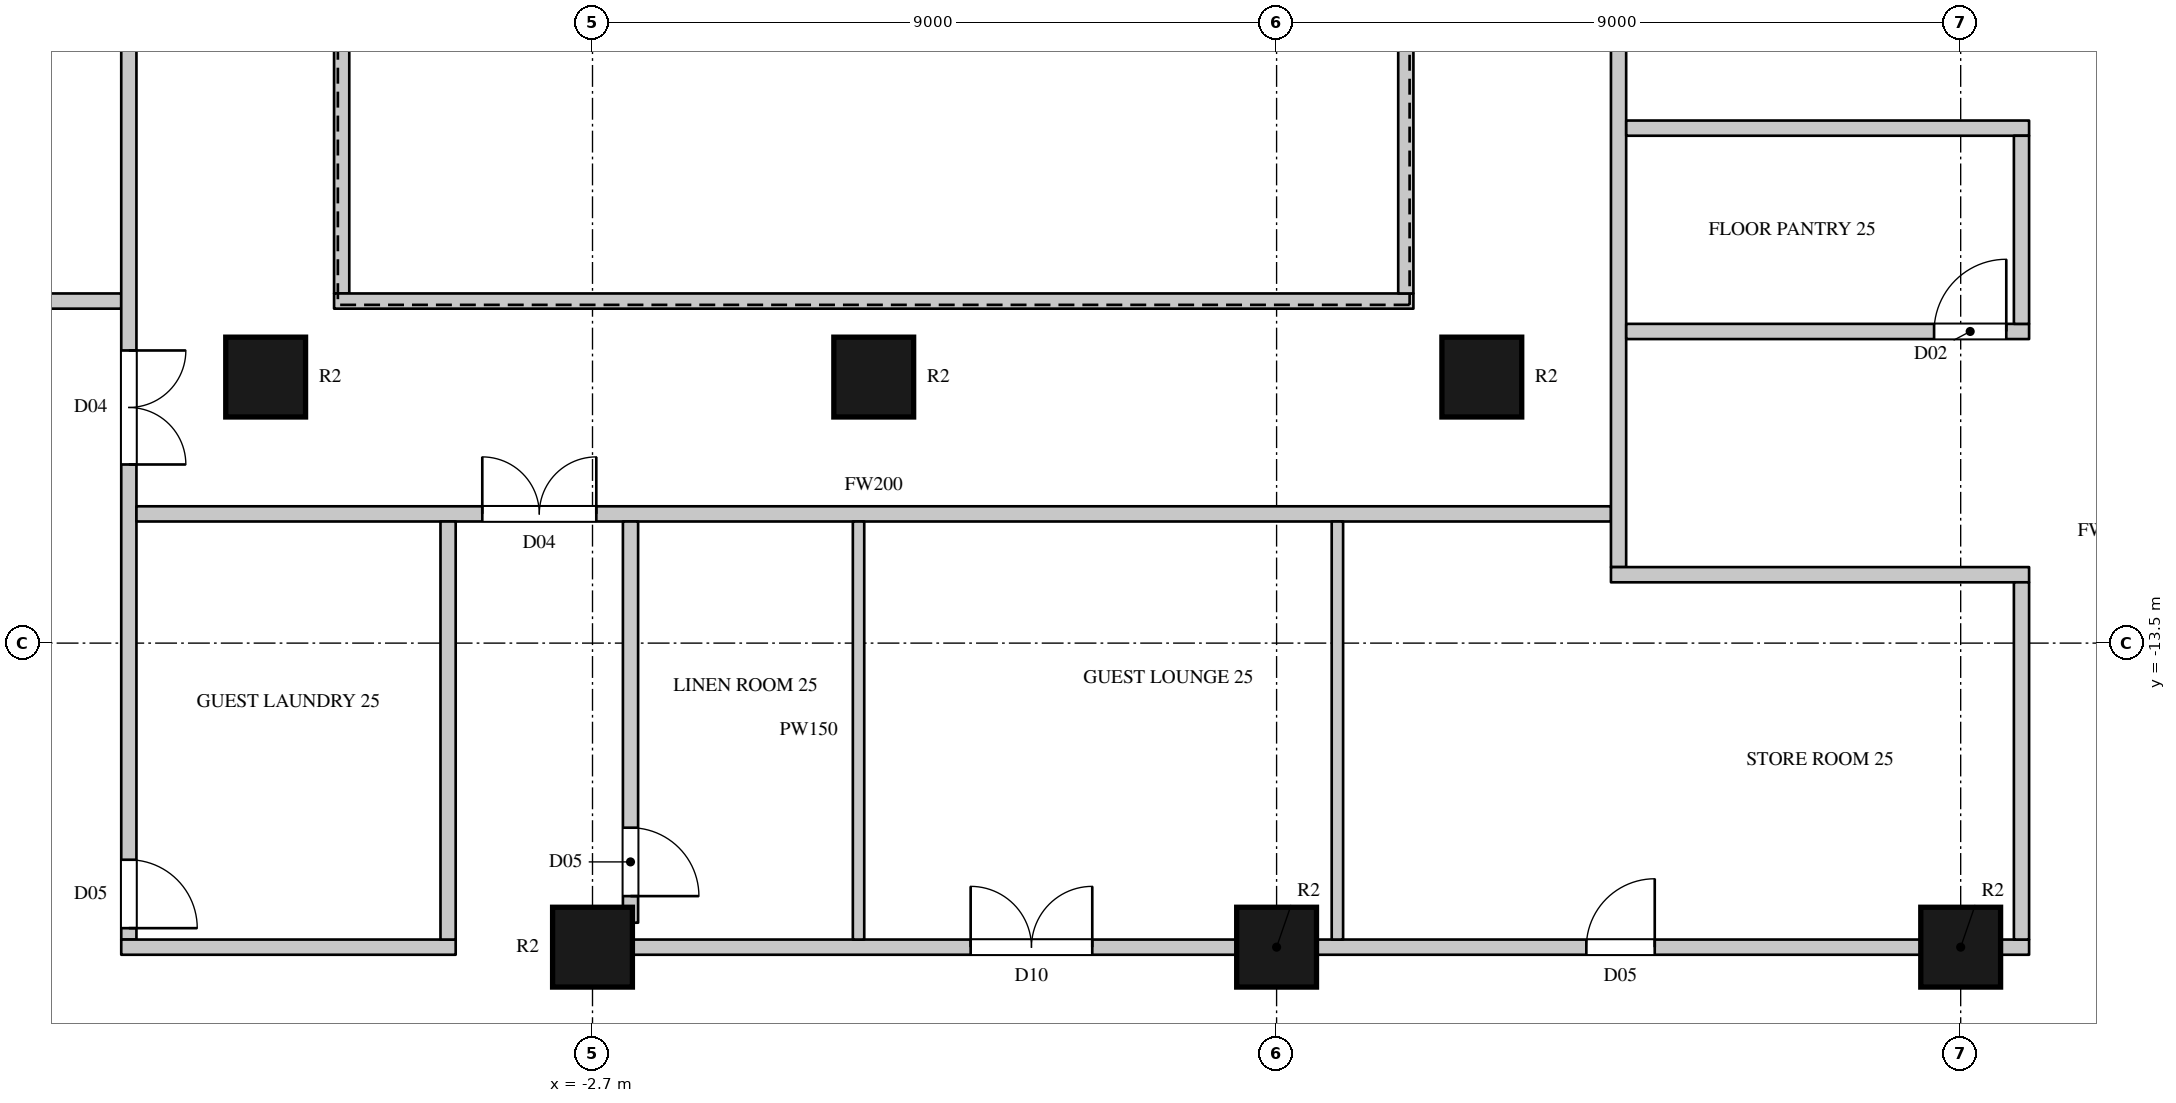
"""IFC4 building model, lengths in metres.
Left out: names, types, materials, properties, quantities, classifications, styles, units other than length and angle.
Written with IfcOpenShell. Run it as: python <this file> out.ifc"""

import sys

from ifc_helpers import new_model, si_unit, direction, frame, frame_2d, origin, origin_2d, place, context, subcontext, project, spatial, rectangle, circle, extrude, element, fill, save


model = new_model("IFC4")
c1 = context("Model", 3, precision=1e-05, world=origin(), true_north=direction((0.0, 1.0)))
c2 = subcontext(c1, "Body", "Model", "MODEL_VIEW")
j1 = project(units=[si_unit("LENGTHUNIT", "METRE"), si_unit("PLANEANGLEUNIT", "RADIAN")], contexts=[c1])
p1 = place(None, origin())
s1 = spatial("IfcSite", under=j1, at=p1, CompositionType="ELEMENT")
p2 = place(p1, origin())
s2 = spatial("IfcBuilding", under=s1, at=p2, CompositionType="ELEMENT")
p3 = place(p2, frame((0.0, 0.0, 120.3)))
s3 = spatial("IfcBuildingStorey", under=s2, at=p3, CompositionType="ELEMENT", Elevation=120.3)
for number, where, z_axis, x_axis in (
    (1, (-2.7, -17.5, 0.0), (0.0, 0.0, 1.0), (1.0, 0.0, 0.0)),
    (2, (6.3, -17.5, 0.0), (0.0, 0.0, 1.0), (1.0, 0.0, 0.0)),
    (3, (15.3, -17.5, 0.0), (0.0, 0.0, 1.0), (1.0, 0.0, 0.0)),
    (4, (-7.0, -10.0, 0.0), (0.0, 0.0, 1.0), (1.0, 0.0, 0.0)),
    (5, (1.0, -10.0, 0.0), (0.0, 0.0, 1.0), (1.0, 0.0, 0.0)),
    (6, (9.0, -10.0, 0.0), (0.0, 0.0, 1.0), (1.0, 0.0, 0.0)),
):
    element("IfcColumn", number, at=place(p3, frame(where, z_axis=z_axis, x_axis=x_axis)), inside=s3, PredefinedType="COLUMN", context=c2, shape_type="SweptSolid", body=[
        extrude(circle(Radius=0.525, at=origin_2d()), origin(), (0.0, 0.0, 1.0), 3.6),
    ])
p4 = place(p3, frame((-13.97, -9.0, 0.0), z_axis=(0.0, 0.0, 1.0), x_axis=(1.0, 0.0, 0.0)))
e7 = element("IfcWall", 7, at=p4, inside=s3, PredefinedType="PARTITIONING", context=c2, shape_type="SweptSolid", body=[
    extrude(rectangle(XDim=5.07, YDim=0.2, at=frame_2d((2.535, 0.0))), origin(), (0.0, 0.0, 1.0), 3.3),
])
p5 = place(p4, frame((0.4, 0.0, 0.0)))
e8 = element("IfcOpeningElement", 8, at=p5, cuts=e7, PredefinedType="OPENING", context=c2, shape_type="SweptSolid", body=[
    extrude(rectangle(XDim=1.5, YDim=2.2, at=frame_2d((0.75, 1.1))), frame((0.0, 0.11, 0.0), z_axis=(0.0, -1.0, 0.0), x_axis=(1.0, 0.0, 0.0)), (0.0, 0.0, 1.0), 0.22),
])
p6 = place(p4, frame((2.05, 0.0, 0.0)))
e9 = element("IfcOpeningElement", 9, at=p6, cuts=e7, PredefinedType="OPENING", context=c2, shape_type="SweptSolid", body=[
    extrude(rectangle(XDim=1.5, YDim=2.2, at=frame_2d((0.75, 1.1))), frame((0.0, 0.11, 0.0), z_axis=(0.0, -1.0, 0.0), x_axis=(1.0, 0.0, 0.0)), (0.0, 0.0, 1.0), 0.22),
])
p7 = place(p3, frame((-8.8, -17.4, 0.0), z_axis=(0.0, 0.0, 1.0), x_axis=(0.0, 1.0, 0.0)))
e10 = element("IfcWall", 10, at=p7, inside=s3, PredefinedType="PARTITIONING", context=c2, shape_type="SweptSolid", body=[
    extrude(rectangle(XDim=29.1, YDim=0.2, at=frame_2d((14.55, 0.0))), origin(), (0.0, 0.0, 1.0), 3.3),
])
p8 = place(p7, frame((21.15, 0.0, 0.0)))
e11 = element("IfcOpeningElement", 11, at=p8, cuts=e10, PredefinedType="OPENING", context=c2, shape_type="SweptSolid", body=[
    extrude(rectangle(XDim=1.5, YDim=2.2, at=frame_2d((0.75, 1.1))), frame((0.0, 0.11, 0.0), z_axis=(0.0, -1.0, 0.0), x_axis=(1.0, 0.0, 0.0)), (0.0, 0.0, 1.0), 0.22),
])
p9 = place(p7, frame((6.25, 0.0, 0.0)))
e12 = element("IfcOpeningElement", 12, at=p9, cuts=e10, PredefinedType="OPENING", context=c2, shape_type="SweptSolid", body=[
    extrude(rectangle(XDim=1.5, YDim=2.2, at=frame_2d((0.75, 1.1))), frame((0.0, 0.11, 0.0), z_axis=(0.0, -1.0, 0.0), x_axis=(1.0, 0.0, 0.0)), (0.0, 0.0, 1.0), 0.22),
])
p10 = place(p7, frame((27.45, 0.0, 0.0)))
e13 = element("IfcOpeningElement", 13, at=p10, cuts=e10, PredefinedType="OPENING", context=c2, shape_type="SweptSolid", body=[
    extrude(rectangle(XDim=1.5, YDim=2.2, at=frame_2d((0.75, 1.1))), frame((0.0, 0.11, 0.0), z_axis=(0.0, -1.0, 0.0), x_axis=(1.0, 0.0, 0.0)), (0.0, 0.0, 1.0), 0.22),
])
p11 = place(p7, frame((0.15, 0.0, 0.0)))
e14 = element("IfcOpeningElement", 14, at=p11, cuts=e10, PredefinedType="OPENING", context=c2, shape_type="SweptSolid", body=[
    extrude(rectangle(XDim=0.9, YDim=2.2, at=frame_2d((0.45, 1.1))), frame((0.0, 0.11, 0.0), z_axis=(0.0, -1.0, 0.0), x_axis=(1.0, 0.0, 0.0)), (0.0, 0.0, 1.0), 0.22),
])
p12 = place(p3, frame((-8.9, -17.5, 0.0), z_axis=(0.0, 0.0, 1.0), x_axis=(1.0, 0.0, 0.0)))
e15 = element("IfcWall", 15, at=p12, inside=s3, PredefinedType="PARTITIONING", context=c2, shape_type="SweptSolid", body=[
    extrude(rectangle(XDim=4.4, YDim=0.2, at=frame_2d((2.2, 0.0))), origin(), (0.0, 0.0, 1.0), 2.75),
])
p13 = place(p3, frame((-8.7, -11.8, 0.0), z_axis=(0.0, 0.0, 1.0), x_axis=(1.0, 0.0, 0.0)))
e16 = element("IfcWall", 16, at=p13, inside=s3, PredefinedType="PARTITIONING", context=c2, shape_type="SweptSolid", body=[
    extrude(rectangle(XDim=19.4, YDim=0.2, at=frame_2d((9.7, 0.0))), origin(), (0.0, 0.0, 1.0), 3.3),
])
p14 = place(p13, frame((4.55, 0.0, 0.0)))
e17 = element("IfcOpeningElement", 17, at=p14, cuts=e16, PredefinedType="OPENING", context=c2, shape_type="SweptSolid", body=[
    extrude(rectangle(XDim=1.5, YDim=2.2, at=frame_2d((0.75, 1.1))), frame((0.0, 0.11, 0.0), z_axis=(0.0, -1.0, 0.0), x_axis=(1.0, 0.0, 0.0)), (0.0, 0.0, 1.0), 0.22),
])
p15 = place(p3, frame((-6.0, -8.9, 0.0), z_axis=(0.0, 0.0, 1.0), x_axis=(0.0, 1.0, 0.0)))
e18 = element("IfcWall", 18, at=p15, inside=s3, PredefinedType="PARTITIONING", context=c2, shape_type="SweptSolid", body=[
    extrude(rectangle(XDim=17.8, YDim=0.2, at=frame_2d((8.9, 0.0))), origin(), (0.0, 0.0, 1.0), 3.3),
])
p16 = place(p3, frame((-6.1, -9.0, 0.0), z_axis=(0.0, 0.0, 1.0), x_axis=(1.0, 0.0, 0.0)))
e19 = element("IfcWall", 19, at=p16, inside=s3, PredefinedType="PARTITIONING", context=c2, shape_type="SweptSolid", body=[
    extrude(rectangle(XDim=14.2, YDim=0.2, at=frame_2d((7.1, 0.0))), origin(), (0.0, 0.0, 1.0), 3.3),
])
p17 = place(p3, frame((-4.6, -17.4, 0.0), z_axis=(0.0, 0.0, 1.0), x_axis=(0.0, 1.0, 0.0)))
e20 = element("IfcWall", 20, at=p17, inside=s3, PredefinedType="PARTITIONING", context=c2, shape_type="SweptSolid", body=[
    extrude(rectangle(XDim=5.5, YDim=0.2, at=frame_2d((2.75, 0.0))), origin(), (0.0, 0.0, 1.0), 3.3),
])
p18 = place(p3, frame((-2.2, -17.178, 0.0), z_axis=(0.0, 0.0, 1.0), x_axis=(0.0, 1.0, 0.0)))
e21 = element("IfcWall", 21, at=p18, inside=s3, PredefinedType="PARTITIONING", context=c2, shape_type="SweptSolid", body=[
    extrude(rectangle(XDim=5.279, YDim=0.2, at=frame_2d((2.639, 0.0))), origin(), (0.0, 0.0, 1.0), 3.3),
])
p19 = place(p18, frame((0.35, 0.0, 0.0)))
e22 = element("IfcOpeningElement", 22, at=p19, cuts=e21, PredefinedType="OPENING", context=c2, shape_type="SweptSolid", body=[
    extrude(rectangle(XDim=0.9, YDim=2.2, at=frame_2d((0.45, 1.1))), frame((0.0, 0.11, 0.0), z_axis=(0.0, -1.0, 0.0), x_axis=(1.0, 0.0, 0.0)), (0.0, 0.0, 1.0), 0.22),
])
p20 = place(p3, frame((-2.175, -17.5, 0.0), z_axis=(0.0, 0.0, 1.0), x_axis=(1.0, 0.0, 0.0)))
e23 = element("IfcWall", 23, at=p20, inside=s3, PredefinedType="PARTITIONING", context=c2, shape_type="SweptSolid", body=[
    extrude(rectangle(XDim=7.95, YDim=0.2, at=frame_2d((3.975, 0.0))), origin(), (0.0, 0.0, 1.0), 2.75),
])
p21 = place(p20, frame((4.45, 0.0, 0.0)))
e24 = element("IfcOpeningElement", 24, at=p21, cuts=e23, PredefinedType="OPENING", context=c2, shape_type="SweptSolid", body=[
    extrude(rectangle(XDim=1.6, YDim=2.4, at=frame_2d((0.8, 1.2))), frame((0.0, 0.11, 0.0), z_axis=(0.0, -1.0, 0.0), x_axis=(1.0, 0.0, 0.0)), (0.0, 0.0, 1.0), 0.22),
])
p22 = place(p3, frame((6.825, -17.5, 0.0), z_axis=(0.0, 0.0, 1.0), x_axis=(1.0, 0.0, 0.0)))
e25 = element("IfcWall", 25, at=p22, inside=s3, PredefinedType="PARTITIONING", context=c2, shape_type="SweptSolid", body=[
    extrude(rectangle(XDim=7.95, YDim=0.2, at=frame_2d((3.975, 0.0))), origin(), (0.0, 0.0, 1.0), 2.75),
])
p23 = place(p22, frame((3.55, 0.0, 0.0)))
e26 = element("IfcOpeningElement", 26, at=p23, cuts=e25, PredefinedType="OPENING", context=c2, shape_type="SweptSolid", body=[
    extrude(rectangle(XDim=0.9, YDim=2.2, at=frame_2d((0.45, 1.1))), frame((0.0, 0.11, 0.0), z_axis=(0.0, -1.0, 0.0), x_axis=(1.0, 0.0, 0.0)), (0.0, 0.0, 1.0), 0.22),
])
p24 = place(p3, frame((15.825, -17.5, 0.0), z_axis=(0.0, 0.0, 1.0), x_axis=(1.0, 0.0, 0.0)))
e27 = element("IfcWall", 27, at=p24, inside=s3, PredefinedType="PARTITIONING", context=c2, shape_type="SweptSolid", body=[
    extrude(rectangle(XDim=0.375, YDim=0.2, at=frame_2d((0.188, 0.0))), origin(), (0.0, 0.0, 1.0), 3.3),
])
p25 = place(p3, frame((8.0, -8.9, 0.0), z_axis=(0.0, 0.0, 1.0), x_axis=(0.0, 1.0, 0.0)))
e28 = element("IfcWall", 28, at=p25, inside=s3, PredefinedType="PARTITIONING", context=c2, shape_type="SweptSolid", body=[
    extrude(rectangle(XDim=17.8, YDim=0.2, at=frame_2d((8.9, 0.0))), origin(), (0.0, 0.0, 1.0), 3.3),
])
p26 = place(p3, frame((10.799, -12.5, 0.0), z_axis=(0.0, 0.0, 1.0), x_axis=(0.0, 1.0, 0.0)))
e29 = element("IfcWall", 29, at=p26, inside=s3, PredefinedType="PARTITIONING", context=c2, shape_type="SweptSolid", body=[
    extrude(rectangle(XDim=24.2, YDim=0.2, at=frame_2d((12.1, 0.0))), origin(), (0.0, 0.0, 1.0), 3.3),
])
p27 = place(p26, frame((13.15, 0.0, 0.0)))
e30 = element("IfcOpeningElement", 30, at=p27, cuts=e29, PredefinedType="OPENING", context=c2, shape_type="SweptSolid", body=[
    extrude(rectangle(XDim=1.5, YDim=2.2, at=frame_2d((0.75, 1.1))), frame((0.0, 0.11, 0.0), z_axis=(0.0, -1.0, 0.0), x_axis=(1.0, 0.0, 0.0)), (0.0, 0.0, 1.0), 0.22),
])
p28 = place(p3, frame((10.699, -12.6, 0.0), z_axis=(0.0, 0.0, 1.0), x_axis=(1.0, 0.0, 0.0)))
e31 = element("IfcWall", 31, at=p28, inside=s3, PredefinedType="PARTITIONING", context=c2, shape_type="SweptSolid", body=[
    extrude(rectangle(XDim=5.501, YDim=0.2, at=frame_2d((2.75, 0.0))), origin(), (0.0, 0.0, 1.0), 3.3),
])
p29 = place(p3, frame((10.9, -9.4, 0.0), z_axis=(0.0, 0.0, 1.0), x_axis=(1.0, 0.0, 0.0)))
e32 = element("IfcWall", 32, at=p29, inside=s3, PredefinedType="PARTITIONING", context=c2, shape_type="SweptSolid", body=[
    extrude(rectangle(XDim=5.3, YDim=0.2, at=frame_2d((2.65, 0.0))), origin(), (0.0, 0.0, 1.0), 3.3),
])
p30 = place(p29, frame((4.05, 0.0, 0.0)))
e33 = element("IfcOpeningElement", 33, at=p30, cuts=e32, PredefinedType="OPENING", context=c2, shape_type="SweptSolid", body=[
    extrude(rectangle(XDim=0.95, YDim=2.2, at=frame_2d((0.475, 1.1))), frame((0.0, 0.11, 0.0), z_axis=(0.0, -1.0, 0.0), x_axis=(1.0, 0.0, 0.0)), (0.0, 0.0, 1.0), 0.22),
])
p31 = place(p3, frame((10.9, -6.725, 0.0), z_axis=(0.0, 0.0, 1.0), x_axis=(1.0, 0.0, 0.0)))
e34 = element("IfcWall", 34, at=p31, inside=s3, PredefinedType="PARTITIONING", context=c2, shape_type="SweptSolid", body=[
    extrude(rectangle(XDim=5.3, YDim=0.2, at=frame_2d((2.65, 0.0))), origin(), (0.0, 0.0, 1.0), 3.3),
])
p32 = place(p3, frame((16.1, -17.4, 0.0), z_axis=(0.0, 0.0, 1.0), x_axis=(0.0, 1.0, 0.0)))
e35 = element("IfcWall", 35, at=p32, inside=s3, PredefinedType="PARTITIONING", context=c2, shape_type="SweptSolid", body=[
    extrude(rectangle(XDim=4.7, YDim=0.2, at=frame_2d((2.35, 0.0))), origin(), (0.0, 0.0, 1.0), 3.3),
])
p33 = place(p3, frame((16.1, -9.3, 0.0), z_axis=(0.0, 0.0, 1.0), x_axis=(0.0, 1.0, 0.0)))
e36 = element("IfcWall", 36, at=p33, inside=s3, PredefinedType="PARTITIONING", context=c2, shape_type="SweptSolid", body=[
    extrude(rectangle(XDim=2.475, YDim=0.2, at=frame_2d((1.238, 0.0))), origin(), (0.0, 0.0, 1.0), 3.3),
])
for number, where, z_axis, x_axis in (
    (37, (0.8, -17.4, 0.0), (0.0, 0.0, 1.0), (0.0, 1.0, 0.0)),
    (38, (7.1, -17.4, 0.0), (0.0, 0.0, 1.0), (0.0, 1.0, 0.0)),
):
    element("IfcWall", number, at=place(p3, frame(where, z_axis=z_axis, x_axis=x_axis)), inside=s3, PredefinedType="PARTITIONING", context=c2, shape_type="SweptSolid", body=[
        extrude(rectangle(XDim=5.5, YDim=0.15, at=frame_2d((2.75, 0.0))), origin(), (0.0, 0.0, 1.0), 3.3),
    ])
p34 = place(p9, origin())
e39 = element("IfcDoor", 39, at=p34, inside=s3, OperationType="DOUBLE_DOOR_SINGLE_SWING", PredefinedType="DOOR", context=c2, shape_type="SweptSolid", body=[
    extrude(rectangle(XDim=1.5, YDim=2.2, at=frame_2d((0.75, 1.1))), frame((0.0, 0.025, 0.0), z_axis=(0.0, -1.0, 0.0), x_axis=(1.0, 0.0, 0.0)), (0.0, 0.0, 1.0), 0.05),
])
fill(e12, e39)
p35 = place(p14, origin())
e40 = element("IfcDoor", 40, at=p35, inside=s3, OperationType="DOUBLE_DOOR_SINGLE_SWING", PredefinedType="DOOR", context=c2, shape_type="SweptSolid", body=[
    extrude(rectangle(XDim=1.5, YDim=2.2, at=frame_2d((0.75, 1.1))), frame((0.0, 0.025, 0.0), z_axis=(0.0, -1.0, 0.0), x_axis=(1.0, 0.0, 0.0)), (0.0, 0.0, 1.0), 0.05),
])
fill(e17, e40)
p36 = place(p11, origin())
e41 = element("IfcDoor", 41, at=p36, inside=s3, OperationType="SINGLE_SWING_RIGHT", PredefinedType="DOOR", context=c2, shape_type="SweptSolid", body=[
    extrude(rectangle(XDim=0.9, YDim=2.2, at=frame_2d((0.45, 1.1))), frame((0.0, 0.025, 0.0), z_axis=(0.0, -1.0, 0.0), x_axis=(1.0, 0.0, 0.0)), (0.0, 0.0, 1.0), 0.05),
])
fill(e14, e41)
p37 = place(p19, origin())
e42 = element("IfcDoor", 42, at=p37, inside=s3, OperationType="SINGLE_SWING_RIGHT", PredefinedType="DOOR", context=c2, shape_type="SweptSolid", body=[
    extrude(rectangle(XDim=0.9, YDim=2.2, at=frame_2d((0.45, 1.1))), frame((0.0, 0.025, 0.0), z_axis=(0.0, -1.0, 0.0), x_axis=(1.0, 0.0, 0.0)), (0.0, 0.0, 1.0), 0.05),
])
fill(e22, e42)
p38 = place(p21, origin())
e43 = element("IfcDoor", 43, at=p38, inside=s3, OperationType="DOUBLE_DOOR_SINGLE_SWING", PredefinedType="DOOR", context=c2, shape_type="SweptSolid", body=[
    extrude(rectangle(XDim=1.6, YDim=2.4, at=frame_2d((0.8, 1.2))), frame((0.0, 0.025, 0.0), z_axis=(0.0, -1.0, 0.0), x_axis=(1.0, 0.0, 0.0)), (0.0, 0.0, 1.0), 0.05),
])
fill(e24, e43)
p39 = place(p23, origin())
e44 = element("IfcDoor", 44, at=p39, inside=s3, OperationType="SINGLE_SWING_RIGHT", PredefinedType="DOOR", context=c2, shape_type="SweptSolid", body=[
    extrude(rectangle(XDim=0.9, YDim=2.2, at=frame_2d((0.45, 1.1))), frame((0.0, 0.025, 0.0), z_axis=(0.0, -1.0, 0.0), x_axis=(1.0, 0.0, 0.0)), (0.0, 0.0, 1.0), 0.05),
])
fill(e26, e44)
p40 = place(p30, origin())
e45 = element("IfcDoor", 45, at=p40, inside=s3, OperationType="SINGLE_SWING_RIGHT", PredefinedType="DOOR", context=c2, shape_type="SweptSolid", body=[
    extrude(rectangle(XDim=0.95, YDim=2.2, at=frame_2d((0.475, 1.1))), frame((0.0, 0.025, 0.0), z_axis=(0.0, -1.0, 0.0), x_axis=(1.0, 0.0, 0.0)), (0.0, 0.0, 1.0), 0.05),
])
fill(e33, e45)
save(model, sys.argv[1])
